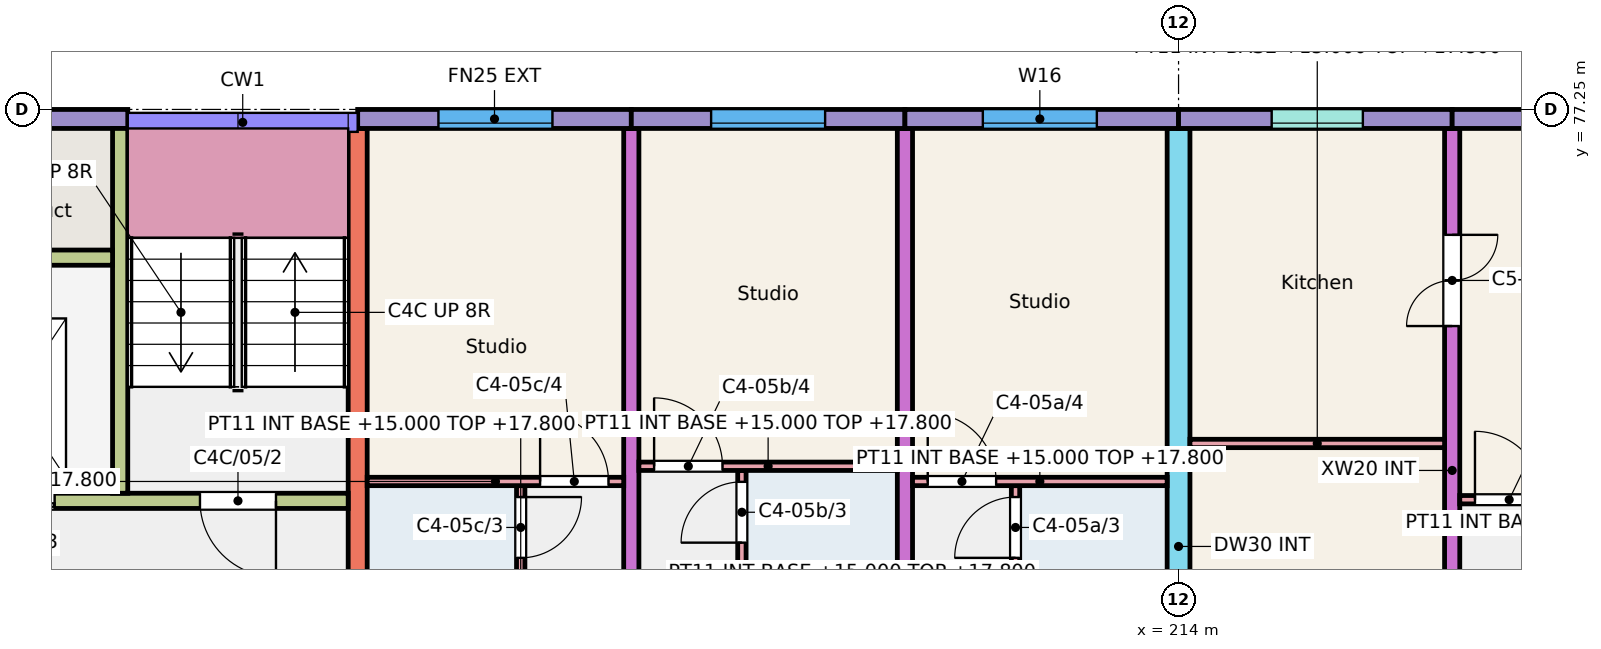
"""IFC4 building model, lengths in metres.
Left out: names, types, materials, properties, quantities, classifications, styles, units other than length and angle.
Written with IfcOpenShell. Run it as: python <this file> out.ifc"""

import sys

from ifc_helpers import new_model, si_unit, direction, frame, frame_2d, origin, place, context, subcontext, project, spatial, rectangle, extrude, element, fill, save


model = new_model("IFC4")
c1 = context("Model", 3, precision=1e-05, world=origin(), true_north=direction((0.0, 1.0)))
c2 = subcontext(c1, "Body", "Model", "MODEL_VIEW")
j1 = project(units=[si_unit("LENGTHUNIT", "METRE"), si_unit("PLANEANGLEUNIT", "RADIAN")], contexts=[c1])
p1 = place(None, origin())
s1 = spatial("IfcSite", under=j1, at=p1, CompositionType="ELEMENT")
p2 = place(p1, origin())
s2 = spatial("IfcBuilding", under=s1, at=p2, CompositionType="ELEMENT")
p3 = place(p2, frame((0.0, 0.0, 15.0)))
s3 = spatial("IfcBuildingStorey", under=s2, at=p3, CompositionType="ELEMENT", Elevation=15.0)
p4 = place(p3, frame((203.2, 68.0, 0.0), z_axis=(0.0, 0.0, 1.0), x_axis=(0.0, 1.0, 0.0)))
e1 = element("IfcWall", 1, at=p4, inside=s3, PredefinedType="SHEAR", context=c2, shape_type="SweptSolid", body=[
    extrude(rectangle(XDim=9.0, YDim=0.25, at=frame_2d((4.5, 0.0))), origin(), (0.0, 0.0, 1.0), 3.0),
])
for number, where, z_axis, x_axis in (
    (2, (206.8, 68.0, 0.0), (0.0, 0.0, 1.0), (0.0, 1.0, 0.0)),
    (3, (210.4, 68.0, 0.0), (0.0, 0.0, 1.0), (0.0, 1.0, 0.0)),
):
    element("IfcWall", number, at=place(p3, frame(where, z_axis=z_axis, x_axis=x_axis)), inside=s3, PredefinedType="SHEAR", context=c2, shape_type="SweptSolid", body=[
        extrude(rectangle(XDim=9.0, YDim=0.2, at=frame_2d((4.5, 0.0))), origin(), (0.0, 0.0, 1.0), 3.0),
    ])
p5 = place(p3, frame((214.0, 66.0, 0.0), z_axis=(0.0, 0.0, 1.0), x_axis=(0.0, 1.0, 0.0)))
e4 = element("IfcWall", 4, at=p5, inside=s3, PredefinedType="SHEAR", context=c2, shape_type="SweptSolid", body=[
    extrude(rectangle(XDim=11.0, YDim=0.3, at=frame_2d((5.5, 0.0))), origin(), (0.0, 0.0, 1.0), 3.0),
])
p6 = place(p5, frame((0.3, 0.0, 0.0)))
e5 = element("IfcOpeningElement", 5, at=p6, cuts=e4, PredefinedType="OPENING", context=c2, shape_type="SweptSolid", body=[
    extrude(rectangle(XDim=1.2, YDim=2.1, at=frame_2d((0.6, 1.05))), frame((0.0, 0.16, 0.0), z_axis=(0.0, -1.0, 0.0), x_axis=(1.0, 0.0, 0.0)), (0.0, 0.0, 1.0), 0.32),
])
p7 = place(p3, frame((217.6, 68.0, 0.0), z_axis=(0.0, 0.0, 1.0), x_axis=(0.0, 1.0, 0.0)))
e6 = element("IfcWall", 6, at=p7, inside=s3, PredefinedType="SHEAR", context=c2, shape_type="SweptSolid", body=[
    extrude(rectangle(XDim=9.0, YDim=0.2, at=frame_2d((4.5, 0.0))), origin(), (0.0, 0.0, 1.0), 3.0),
])
p8 = place(p7, frame((0.175, 0.0, 0.0)))
e7 = element("IfcOpeningElement", 7, at=p8, cuts=e6, PredefinedType="OPENING", context=c2, shape_type="SweptSolid", body=[
    extrude(rectangle(XDim=1.2, YDim=2.1, at=frame_2d((0.6, 1.05))), frame((0.0, 0.11, 0.0), z_axis=(0.0, -1.0, 0.0), x_axis=(1.0, 0.0, 0.0)), (0.0, 0.0, 1.0), 0.22),
])
p9 = place(p7, frame((6.4, 0.0, 0.0)))
e8 = element("IfcOpeningElement", 8, at=p9, cuts=e6, PredefinedType="OPENING", context=c2, shape_type="SweptSolid", body=[
    extrude(rectangle(XDim=1.2, YDim=2.1, at=frame_2d((0.6, 1.05))), frame((0.0, 0.11, 0.0), z_axis=(0.0, -1.0, 0.0), x_axis=(1.0, 0.0, 0.0)), (0.0, 0.0, 1.0), 0.22),
])
p10 = place(p3, frame((197.2, 77.125, 0.0), z_axis=(0.0, 0.0, 1.0), x_axis=(1.0, 0.0, 0.0)))
e9 = element("IfcWall", 9, at=p10, inside=s3, PredefinedType="SOLIDWALL", context=c2, shape_type="SweptSolid", body=[
    extrude(rectangle(XDim=2.975, YDim=0.25, at=frame_2d((1.488, 0.0))), origin(), (0.0, 0.0, 1.0), 3.0),
])
p11 = place(p3, frame((197.35, 72.1, 0.0), z_axis=(0.0, 0.0, 1.0), x_axis=(1.0, 0.0, 0.0)))
e10 = element("IfcWall", 10, at=p11, inside=s3, PredefinedType="SHEAR", context=c2, shape_type="SweptSolid", body=[
    extrude(rectangle(XDim=5.725, YDim=0.2, at=frame_2d((2.862, 0.0))), origin(), (0.0, 0.0, 1.0), 3.0),
])
p12 = place(p11, frame((3.775, 0.0, 0.0)))
e11 = element("IfcOpeningElement", 11, at=p12, cuts=e10, PredefinedType="OPENING", context=c2, shape_type="SweptSolid", body=[
    extrude(rectangle(XDim=1.0, YDim=2.1, at=frame_2d((0.5, 1.05))), frame((0.0, 0.11, 0.0), z_axis=(0.0, -1.0, 0.0), x_axis=(1.0, 0.0, 0.0)), (0.0, 0.0, 1.0), 0.22),
])
p13 = place(p11, frame((0.762, 0.0, 0.0)))
e12 = element("IfcOpeningElement", 12, at=p13, cuts=e10, PredefinedType="OPENING", context=c2, shape_type="SweptSolid", body=[
    extrude(rectangle(XDim=1.1, YDim=2.1, at=frame_2d((0.55, 1.05))), frame((0.0, 0.11, 0.0), z_axis=(0.0, -1.0, 0.0), x_axis=(1.0, 0.0, 0.0)), (0.0, 0.0, 1.0), 0.22),
])
p14 = place(p3, frame((200.075, 72.2, 0.0), z_axis=(0.0, 0.0, 1.0), x_axis=(0.0, 1.0, 0.0)))
e13 = element("IfcWall", 13, at=p14, inside=s3, PredefinedType="SHEAR", context=c2, shape_type="SweptSolid", body=[
    extrude(rectangle(XDim=4.8, YDim=0.2, at=frame_2d((2.4, 0.0))), origin(), (0.0, 0.0, 1.0), 3.0),
])
p15 = place(p3, frame((197.35, 75.3, 0.0), z_axis=(0.0, 0.0, 1.0), x_axis=(1.0, 0.0, 0.0)))
e14 = element("IfcWall", 14, at=p15, inside=s3, PredefinedType="SHEAR", context=c2, shape_type="SweptSolid", body=[
    extrude(rectangle(XDim=2.625, YDim=0.2, at=frame_2d((1.312, 0.0))), origin(), (0.0, 0.0, 1.0), 3.0),
])
p16 = place(p3, frame((203.2, 77.125, 0.0), z_axis=(0.0, 0.0, 1.0), x_axis=(1.0, 0.0, 0.0)))
e15 = element("IfcWall", 15, at=p16, inside=s3, PredefinedType="SOLIDWALL", context=c2, shape_type="SweptSolid", body=[
    extrude(rectangle(XDim=3.6, YDim=0.25, at=frame_2d((1.8, 0.0))), origin(), (0.0, 0.0, 1.0), 3.0),
])
p17 = place(p16, frame((1.062, 0.0, 0.9)))
e16 = element("IfcOpeningElement", 16, at=p17, cuts=e15, PredefinedType="OPENING", context=c2, shape_type="SweptSolid", body=[
    extrude(rectangle(XDim=1.5, YDim=1.5, at=frame_2d((0.75, 0.75))), frame((0.0, 0.135, 0.0), z_axis=(0.0, -1.0, 0.0), x_axis=(1.0, 0.0, 0.0)), (0.0, 0.0, 1.0), 0.27),
])
p18 = place(p3, frame((206.8, 77.125, 0.0), z_axis=(0.0, 0.0, 1.0), x_axis=(1.0, 0.0, 0.0)))
e17 = element("IfcWall", 17, at=p18, inside=s3, PredefinedType="SOLIDWALL", context=c2, shape_type="SweptSolid", body=[
    extrude(rectangle(XDim=3.6, YDim=0.25, at=frame_2d((1.8, 0.0))), origin(), (0.0, 0.0, 1.0), 3.0),
])
p19 = place(p18, frame((1.05, 0.0, 0.9)))
e18 = element("IfcOpeningElement", 18, at=p19, cuts=e17, PredefinedType="OPENING", context=c2, shape_type="SweptSolid", body=[
    extrude(rectangle(XDim=1.5, YDim=1.5, at=frame_2d((0.75, 0.75))), frame((0.0, 0.135, 0.0), z_axis=(0.0, -1.0, 0.0), x_axis=(1.0, 0.0, 0.0)), (0.0, 0.0, 1.0), 0.27),
])
p20 = place(p3, frame((210.4, 77.125, 0.0), z_axis=(0.0, 0.0, 1.0), x_axis=(1.0, 0.0, 0.0)))
e19 = element("IfcWall", 19, at=p20, inside=s3, PredefinedType="SOLIDWALL", context=c2, shape_type="SweptSolid", body=[
    extrude(rectangle(XDim=3.6, YDim=0.25, at=frame_2d((1.8, 0.0))), origin(), (0.0, 0.0, 1.0), 3.0),
])
p21 = place(p20, frame((1.025, 0.0, 0.9)))
e20 = element("IfcOpeningElement", 20, at=p21, cuts=e19, PredefinedType="OPENING", context=c2, shape_type="SweptSolid", body=[
    extrude(rectangle(XDim=1.5, YDim=1.5, at=frame_2d((0.75, 0.75))), frame((0.0, 0.135, 0.0), z_axis=(0.0, -1.0, 0.0), x_axis=(1.0, 0.0, 0.0)), (0.0, 0.0, 1.0), 0.27),
])
p22 = place(p3, frame((214.0, 77.125, 0.0), z_axis=(0.0, 0.0, 1.0), x_axis=(1.0, 0.0, 0.0)))
e21 = element("IfcWall", 21, at=p22, inside=s3, PredefinedType="SOLIDWALL", context=c2, shape_type="SweptSolid", body=[
    extrude(rectangle(XDim=3.6, YDim=0.25, at=frame_2d((1.8, 0.0))), origin(), (0.0, 0.0, 1.0), 3.0),
])
p23 = place(p22, frame((1.225, 0.0, 1.1)))
e22 = element("IfcOpeningElement", 22, at=p23, cuts=e21, PredefinedType="OPENING", context=c2, shape_type="SweptSolid", body=[
    extrude(rectangle(XDim=1.2, YDim=1.3, at=frame_2d((0.6, 0.65))), frame((0.0, 0.135, 0.0), z_axis=(0.0, -1.0, 0.0), x_axis=(1.0, 0.0, 0.0)), (0.0, 0.0, 1.0), 0.27),
])
p24 = place(p3, frame((217.6, 77.125, 0.0), z_axis=(0.0, 0.0, 1.0), x_axis=(1.0, 0.0, 0.0)))
e23 = element("IfcWall", 23, at=p24, inside=s3, PredefinedType="SOLIDWALL", context=c2, shape_type="SweptSolid", body=[
    extrude(rectangle(XDim=3.6, YDim=0.25, at=frame_2d((1.8, 0.0))), origin(), (0.0, 0.0, 1.0), 3.0),
])
p25 = place(p24, frame((1.05, 0.0, 0.9)))
e24 = element("IfcOpeningElement", 24, at=p25, cuts=e23, PredefinedType="OPENING", context=c2, shape_type="SweptSolid", body=[
    extrude(rectangle(XDim=1.5, YDim=1.5, at=frame_2d((0.75, 0.75))), frame((0.0, 0.135, 0.0), z_axis=(0.0, -1.0, 0.0), x_axis=(1.0, 0.0, 0.0)), (0.0, 0.0, 1.0), 0.27),
])
p26 = place(p3, frame((211.855, 68.0, 0.0), z_axis=(0.0, 0.0, 1.0), x_axis=(0.0, 1.0, 0.0)))
e25 = element("IfcWall", 25, at=p26, inside=s3, PredefinedType="PARTITIONING", context=c2, shape_type="SweptSolid", body=[
    extrude(rectangle(XDim=4.3, YDim=0.11, at=frame_2d((2.15, 0.0))), origin(), (0.0, 0.0, 1.0), 2.8),
])
p27 = place(p26, frame((0.2, 0.0, 0.0)))
e26 = element("IfcOpeningElement", 26, at=p27, cuts=e25, PredefinedType="OPENING", context=c2, shape_type="SweptSolid", body=[
    extrude(rectangle(XDim=0.8, YDim=2.1, at=frame_2d((0.4, 1.05))), frame((0.0, 0.065, 0.0), z_axis=(0.0, -1.0, 0.0), x_axis=(1.0, 0.0, 0.0)), (0.0, 0.0, 1.0), 0.13),
])
p28 = place(p26, frame((3.35, 0.0, 0.0)))
e27 = element("IfcOpeningElement", 27, at=p28, cuts=e25, PredefinedType="OPENING", context=c2, shape_type="SweptSolid", body=[
    extrude(rectangle(XDim=0.8, YDim=2.1, at=frame_2d((0.4, 1.05))), frame((0.0, 0.065, 0.0), z_axis=(0.0, -1.0, 0.0), x_axis=(1.0, 0.0, 0.0)), (0.0, 0.0, 1.0), 0.13),
])
p29 = place(p3, frame((210.5, 72.355, 0.0), z_axis=(0.0, 0.0, 1.0), x_axis=(1.0, 0.0, 0.0)))
e28 = element("IfcWall", 28, at=p29, inside=s3, PredefinedType="PARTITIONING", context=c2, shape_type="SweptSolid", body=[
    extrude(rectangle(XDim=3.35, YDim=0.11, at=frame_2d((1.675, 0.0))), origin(), (0.0, 0.0, 1.0), 2.8),
])
p30 = place(p29, frame((0.2, 0.0, 0.0)))
e29 = element("IfcOpeningElement", 29, at=p30, cuts=e28, PredefinedType="OPENING", context=c2, shape_type="SweptSolid", body=[
    extrude(rectangle(XDim=0.9, YDim=2.1, at=frame_2d((0.45, 1.05))), frame((0.0, 0.065, 0.0), z_axis=(0.0, -1.0, 0.0), x_axis=(1.0, 0.0, 0.0)), (0.0, 0.0, 1.0), 0.13),
])
p31 = place(p3, frame((208.255, 68.0, 0.0), z_axis=(0.0, 0.0, 1.0), x_axis=(0.0, 1.0, 0.0)))
e30 = element("IfcWall", 30, at=p31, inside=s3, PredefinedType="PARTITIONING", context=c2, shape_type="SweptSolid", body=[
    extrude(rectangle(XDim=4.5, YDim=0.11, at=frame_2d((2.25, 0.0))), origin(), (0.0, 0.0, 1.0), 2.8),
])
p32 = place(p31, frame((0.2, 0.0, 0.0)))
e31 = element("IfcOpeningElement", 31, at=p32, cuts=e30, PredefinedType="OPENING", context=c2, shape_type="SweptSolid", body=[
    extrude(rectangle(XDim=0.8, YDim=2.1, at=frame_2d((0.4, 1.05))), frame((0.0, 0.065, 0.0), z_axis=(0.0, -1.0, 0.0), x_axis=(1.0, 0.0, 0.0)), (0.0, 0.0, 1.0), 0.13),
])
p33 = place(p31, frame((3.55, 0.0, 0.0)))
e32 = element("IfcOpeningElement", 32, at=p33, cuts=e30, PredefinedType="OPENING", context=c2, shape_type="SweptSolid", body=[
    extrude(rectangle(XDim=0.8, YDim=2.1, at=frame_2d((0.4, 1.05))), frame((0.0, 0.065, 0.0), z_axis=(0.0, -1.0, 0.0), x_axis=(1.0, 0.0, 0.0)), (0.0, 0.0, 1.0), 0.13),
])
p34 = place(p3, frame((206.9, 72.555, 0.0), z_axis=(0.0, 0.0, 1.0), x_axis=(1.0, 0.0, 0.0)))
e33 = element("IfcWall", 33, at=p34, inside=s3, PredefinedType="PARTITIONING", context=c2, shape_type="SweptSolid", body=[
    extrude(rectangle(XDim=3.4, YDim=0.11, at=frame_2d((1.7, 0.0))), origin(), (0.0, 0.0, 1.0), 2.8),
])
p35 = place(p34, frame((0.2, 0.0, 0.0)))
e34 = element("IfcOpeningElement", 34, at=p35, cuts=e33, PredefinedType="OPENING", context=c2, shape_type="SweptSolid", body=[
    extrude(rectangle(XDim=0.9, YDim=2.1, at=frame_2d((0.45, 1.05))), frame((0.0, 0.065, 0.0), z_axis=(0.0, -1.0, 0.0), x_axis=(1.0, 0.0, 0.0)), (0.0, 0.0, 1.0), 0.13),
])
p36 = place(p3, frame((205.345, 68.0, 0.0), z_axis=(0.0, 0.0, 1.0), x_axis=(0.0, 1.0, 0.0)))
e35 = element("IfcWall", 35, at=p36, inside=s3, PredefinedType="PARTITIONING", context=c2, shape_type="SweptSolid", body=[
    extrude(rectangle(XDim=4.3, YDim=0.11, at=frame_2d((2.15, 0.0))), origin(), (0.0, 0.0, 1.0), 2.8),
])
p37 = place(p36, frame((0.2, 0.0, 0.0)))
e36 = element("IfcOpeningElement", 36, at=p37, cuts=e35, PredefinedType="OPENING", context=c2, shape_type="SweptSolid", body=[
    extrude(rectangle(XDim=0.8, YDim=2.1, at=frame_2d((0.4, 1.05))), frame((0.0, 0.065, 0.0), z_axis=(0.0, -1.0, 0.0), x_axis=(1.0, 0.0, 0.0)), (0.0, 0.0, 1.0), 0.13),
])
p38 = place(p36, frame((3.35, 0.0, 0.0)))
e37 = element("IfcOpeningElement", 37, at=p38, cuts=e35, PredefinedType="OPENING", context=c2, shape_type="SweptSolid", body=[
    extrude(rectangle(XDim=0.8, YDim=2.1, at=frame_2d((0.4, 1.05))), frame((0.0, 0.065, 0.0), z_axis=(0.0, -1.0, 0.0), x_axis=(1.0, 0.0, 0.0)), (0.0, 0.0, 1.0), 0.13),
])
p39 = place(p3, frame((203.325, 72.355, 0.0), z_axis=(0.0, 0.0, 1.0), x_axis=(1.0, 0.0, 0.0)))
e38 = element("IfcWall", 38, at=p39, inside=s3, PredefinedType="PARTITIONING", context=c2, shape_type="SweptSolid", body=[
    extrude(rectangle(XDim=3.375, YDim=0.11, at=frame_2d((1.688, 0.0))), origin(), (0.0, 0.0, 1.0), 2.8),
])
p40 = place(p39, frame((2.275, 0.0, 0.0)))
e39 = element("IfcOpeningElement", 39, at=p40, cuts=e38, PredefinedType="OPENING", context=c2, shape_type="SweptSolid", body=[
    extrude(rectangle(XDim=0.9, YDim=2.1, at=frame_2d((0.45, 1.05))), frame((0.0, 0.065, 0.0), z_axis=(0.0, -1.0, 0.0), x_axis=(1.0, 0.0, 0.0)), (0.0, 0.0, 1.0), 0.13),
])
p41 = place(p3, frame((217.7, 72.115, 0.0), z_axis=(0.0, 0.0, 1.0), x_axis=(1.0, 0.0, 0.0)))
e40 = element("IfcWall", 40, at=p41, inside=s3, PredefinedType="PARTITIONING", context=c2, shape_type="SweptSolid", body=[
    extrude(rectangle(XDim=3.4, YDim=0.11, at=frame_2d((1.7, 0.0))), origin(), (0.0, 0.0, 1.0), 2.8),
])
p42 = place(p41, frame((0.2, 0.0, 0.0)))
e41 = element("IfcOpeningElement", 41, at=p42, cuts=e40, PredefinedType="OPENING", context=c2, shape_type="SweptSolid", body=[
    extrude(rectangle(XDim=0.9, YDim=2.1, at=frame_2d((0.45, 1.05))), frame((0.0, 0.065, 0.0), z_axis=(0.0, -1.0, 0.0), x_axis=(1.0, 0.0, 0.0)), (0.0, 0.0, 1.0), 0.13),
])
p43 = place(p3, frame((214.15, 72.855, 0.0), z_axis=(0.0, 0.0, 1.0), x_axis=(1.0, 0.0, 0.0)))
e42 = element("IfcWall", 42, at=p43, inside=s3, PredefinedType="PARTITIONING", context=c2, shape_type="SweptSolid", body=[
    extrude(rectangle(XDim=3.35, YDim=0.11, at=frame_2d((1.675, 0.0))), origin(), (0.0, 0.0, 1.0), 2.8),
])
p44 = place(p21, origin())
e43 = element("IfcWindow", 43, at=p44, inside=s3, PartitioningType="SINGLE_PANEL", PredefinedType="WINDOW", context=c2, shape_type="SweptSolid", body=[
    extrude(rectangle(XDim=1.5, YDim=1.5, at=frame_2d((0.75, 0.75))), frame((0.0, -0.025, 0.0), z_axis=(0.0, -1.0, 0.0), x_axis=(1.0, 0.0, 0.0)), (0.0, 0.0, 1.0), 0.06),
])
fill(e20, e43)
p45 = place(p19, origin())
e44 = element("IfcWindow", 44, at=p45, inside=s3, PartitioningType="SINGLE_PANEL", PredefinedType="WINDOW", context=c2, shape_type="SweptSolid", body=[
    extrude(rectangle(XDim=1.5, YDim=1.5, at=frame_2d((0.75, 0.75))), frame((0.0, -0.025, 0.0), z_axis=(0.0, -1.0, 0.0), x_axis=(1.0, 0.0, 0.0)), (0.0, 0.0, 1.0), 0.06),
])
fill(e18, e44)
p46 = place(p17, origin())
e45 = element("IfcWindow", 45, at=p46, inside=s3, PartitioningType="SINGLE_PANEL", PredefinedType="WINDOW", context=c2, shape_type="SweptSolid", body=[
    extrude(rectangle(XDim=1.5, YDim=1.5, at=frame_2d((0.75, 0.75))), frame((0.0, -0.025, 0.0), z_axis=(0.0, -1.0, 0.0), x_axis=(1.0, 0.0, 0.0)), (0.0, 0.0, 1.0), 0.06),
])
fill(e16, e45)
p47 = place(p23, origin())
e46 = element("IfcWindow", 46, at=p47, inside=s3, PartitioningType="SINGLE_PANEL", PredefinedType="WINDOW", context=c2, shape_type="SweptSolid", body=[
    extrude(rectangle(XDim=1.2, YDim=1.3, at=frame_2d((0.6, 0.65))), frame((0.0, -0.025, 0.0), z_axis=(0.0, -1.0, 0.0), x_axis=(1.0, 0.0, 0.0)), (0.0, 0.0, 1.0), 0.06),
])
fill(e22, e46)
p48 = place(p28, origin())
e47 = element("IfcDoor", 47, at=p48, inside=s3, OperationType="SINGLE_SWING_LEFT", PredefinedType="DOOR", context=c2, shape_type="SweptSolid", body=[
    extrude(rectangle(XDim=0.8, YDim=2.1, at=frame_2d((0.4, 1.05))), frame((0.0, 0.025, 0.0), z_axis=(0.0, -1.0, 0.0), x_axis=(1.0, 0.0, 0.0)), (0.0, 0.0, 1.0), 0.05),
])
fill(e27, e47)
p49 = place(p30, origin())
e48 = element("IfcDoor", 48, at=p49, inside=s3, OperationType="SINGLE_SWING_LEFT", PredefinedType="DOOR", context=c2, shape_type="SweptSolid", body=[
    extrude(rectangle(XDim=0.9, YDim=2.1, at=frame_2d((0.45, 1.05))), frame((0.0, 0.025, 0.0), z_axis=(0.0, -1.0, 0.0), x_axis=(1.0, 0.0, 0.0)), (0.0, 0.0, 1.0), 0.05),
])
fill(e29, e48)
p50 = place(p33, origin())
e49 = element("IfcDoor", 49, at=p50, inside=s3, OperationType="SINGLE_SWING_LEFT", PredefinedType="DOOR", context=c2, shape_type="SweptSolid", body=[
    extrude(rectangle(XDim=0.8, YDim=2.1, at=frame_2d((0.4, 1.05))), frame((0.0, 0.025, 0.0), z_axis=(0.0, -1.0, 0.0), x_axis=(1.0, 0.0, 0.0)), (0.0, 0.0, 1.0), 0.05),
])
fill(e32, e49)
p51 = place(p35, origin())
e50 = element("IfcDoor", 50, at=p51, inside=s3, OperationType="SINGLE_SWING_LEFT", PredefinedType="DOOR", context=c2, shape_type="SweptSolid", body=[
    extrude(rectangle(XDim=0.9, YDim=2.1, at=frame_2d((0.45, 1.05))), frame((0.0, 0.025, 0.0), z_axis=(0.0, -1.0, 0.0), x_axis=(1.0, 0.0, 0.0)), (0.0, 0.0, 1.0), 0.05),
])
fill(e34, e50)
p52 = place(p38, origin())
e51 = element("IfcDoor", 51, at=p52, inside=s3, OperationType="SINGLE_SWING_RIGHT", PredefinedType="DOOR", context=c2, shape_type="SweptSolid", body=[
    extrude(rectangle(XDim=0.8, YDim=2.1, at=frame_2d((0.4, 1.05))), frame((0.0, 0.025, 0.0), z_axis=(0.0, -1.0, 0.0), x_axis=(1.0, 0.0, 0.0)), (0.0, 0.0, 1.0), 0.05),
])
fill(e37, e51)
p53 = place(p40, origin())
e52 = element("IfcDoor", 52, at=p53, inside=s3, OperationType="SINGLE_SWING_LEFT", PredefinedType="DOOR", context=c2, shape_type="SweptSolid", body=[
    extrude(rectangle(XDim=0.9, YDim=2.1, at=frame_2d((0.45, 1.05))), frame((0.0, 0.025, 0.0), z_axis=(0.0, -1.0, 0.0), x_axis=(1.0, 0.0, 0.0)), (0.0, 0.0, 1.0), 0.05),
])
fill(e39, e52)
p54 = place(p42, origin())
e53 = element("IfcDoor", 53, at=p54, inside=s3, OperationType="SINGLE_SWING_LEFT", PredefinedType="DOOR", context=c2, shape_type="SweptSolid", body=[
    extrude(rectangle(XDim=0.9, YDim=2.1, at=frame_2d((0.45, 1.05))), frame((0.0, 0.025, 0.0), z_axis=(0.0, -1.0, 0.0), x_axis=(1.0, 0.0, 0.0)), (0.0, 0.0, 1.0), 0.05),
])
fill(e41, e53)
p55 = place(p9, origin())
e54 = element("IfcDoor", 54, at=p55, inside=s3, OperationType="DOUBLE_DOOR_SINGLE_SWING", PredefinedType="DOOR", context=c2, shape_type="SweptSolid", body=[
    extrude(rectangle(XDim=1.2, YDim=2.1, at=frame_2d((0.6, 1.05))), frame((0.0, 0.025, 0.0), z_axis=(0.0, -1.0, 0.0), x_axis=(1.0, 0.0, 0.0)), (0.0, 0.0, 1.0), 0.05),
])
fill(e8, e54)
p56 = place(p12, origin())
e55 = element("IfcDoor", 55, at=p56, inside=s3, OperationType="SINGLE_SWING_RIGHT", PredefinedType="DOOR", context=c2, shape_type="SweptSolid", body=[
    extrude(rectangle(XDim=1.0, YDim=2.1, at=frame_2d((0.5, 1.05))), frame((0.0, 0.025, 0.0), z_axis=(0.0, -1.0, 0.0), x_axis=(1.0, 0.0, 0.0)), (0.0, 0.0, 1.0), 0.05),
])
fill(e11, e55)
p57 = place(p13, origin())
e56 = element("IfcDoor", 56, at=p57, inside=s3, OperationType="DOUBLE_DOOR_SLIDING", PredefinedType="DOOR", context=c2, shape_type="SweptSolid", body=[
    extrude(rectangle(XDim=1.1, YDim=2.1, at=frame_2d((0.55, 1.05))), frame((0.0, 0.025, 0.0), z_axis=(0.0, -1.0, 0.0), x_axis=(1.0, 0.0, 0.0)), (0.0, 0.0, 1.0), 0.05),
])
fill(e12, e56)
save(model, sys.argv[1])
